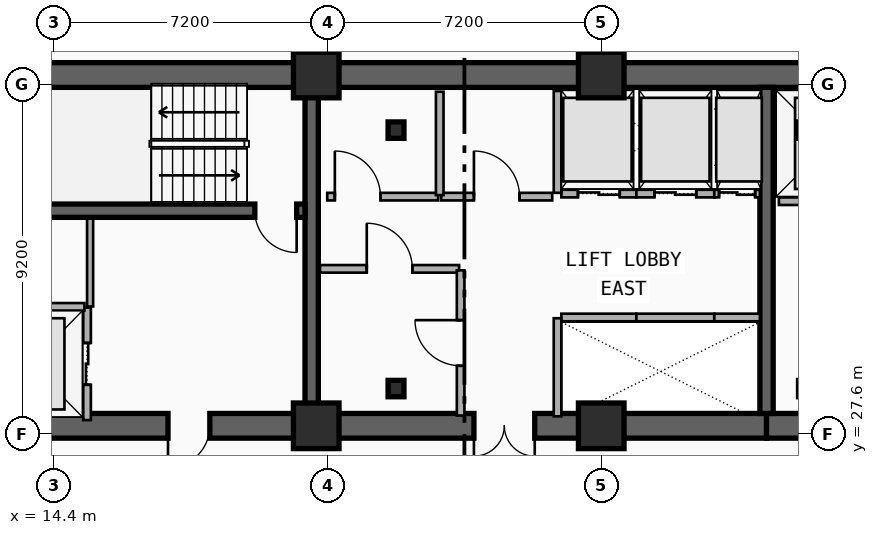
"""IFC4 building model, lengths in metres.
Left out: names, types, materials, properties, quantities, classifications, styles, units other than length and angle.
Written with IfcOpenShell. Run it as: python <this file> out.ifc"""

import sys

from ifc_helpers import new_model, si_unit, direction, frame, frame_2d, origin, origin_2d, place, context, subcontext, project, spatial, rectangle, i_section, extrude, element, fill, save


model = new_model("IFC4")
c1 = context("Model", 3, precision=1e-05, world=origin(), true_north=direction((0.0, 1.0)))
c2 = subcontext(c1, "Body", "Model", "MODEL_VIEW")
j1 = project(units=[si_unit("LENGTHUNIT", "METRE"), si_unit("PLANEANGLEUNIT", "RADIAN")], contexts=[c1])
p1 = place(None, origin())
s1 = spatial("IfcSite", under=j1, at=p1, CompositionType="ELEMENT")
p2 = place(p1, origin())
s2 = spatial("IfcBuilding", under=s1, at=p2, CompositionType="ELEMENT")
p3 = place(p2, frame((0.0, 0.0, 101.3)))
s3 = spatial("IfcBuildingStorey", under=s2, at=p3, CompositionType="ELEMENT", Elevation=101.3)
p4 = place(p3, frame((12.15, 37.05, 0.0), z_axis=(0.0, 0.0, 1.0), x_axis=(1.0, 0.0, 0.0)))
e1 = element("IfcWall", 1, at=p4, inside=s3, PredefinedType="SHEAR", context=c2, shape_type="SweptSolid", body=[
    extrude(rectangle(XDim=33.23, YDim=0.65, at=frame_2d((16.615, 0.0))), origin(), (0.0, 0.0, 1.0), 3.5),
])
p5 = place(p3, frame((21.18, 27.82, 0.0), z_axis=(0.0, 0.0, 1.0), x_axis=(-1.0, 0.0, 0.0)))
e2 = element("IfcWall", 2, at=p5, inside=s3, PredefinedType="SHEAR", context=c2, shape_type="SweptSolid", body=[
    extrude(rectangle(XDim=9.03, YDim=0.65, at=frame_2d((4.515, 0.0))), origin(), (0.0, 0.0, 1.0), 3.5),
])
p6 = place(p5, frame((2.68, 0.0, 0.0)))
e3 = element("IfcOpeningElement", 3, at=p6, cuts=e2, PredefinedType="OPENING", context=c2, shape_type="SweptSolid", body=[
    extrude(rectangle(XDim=1.1, YDim=2.15, at=frame_2d((0.55, 1.075))), frame((0.0, 0.335, 0.0), z_axis=(0.0, -1.0, 0.0), x_axis=(1.0, 0.0, 0.0)), (0.0, 0.0, 1.0), 0.67),
])
p7 = place(p3, frame((33.15, 27.82, 0.0), z_axis=(0.0, 0.0, 1.0), x_axis=(-1.0, 0.0, 0.0)))
e4 = element("IfcWall", 4, at=p7, inside=s3, PredefinedType="SHEAR", context=c2, shape_type="SweptSolid", body=[
    extrude(rectangle(XDim=11.97, YDim=0.65, at=frame_2d((5.985, 0.0))), origin(), (0.0, 0.0, 1.0), 3.5),
])
p8 = place(p7, frame((6.1, 0.0, 0.0)))
e5 = element("IfcOpeningElement", 5, at=p8, cuts=e4, PredefinedType="OPENING", context=c2, shape_type="SweptSolid", body=[
    extrude(rectangle(XDim=1.6, YDim=2.2, at=frame_2d((0.8, 1.1))), frame((0.0, 0.335, 0.0), z_axis=(0.0, -1.0, 0.0), x_axis=(1.0, 0.0, 0.0)), (0.0, 0.0, 1.0), 0.67),
])
p9 = place(p3, frame((45.38, 27.82, 0.0), z_axis=(0.0, 0.0, 1.0), x_axis=(-1.0, 0.0, 0.0)))
e6 = element("IfcWall", 6, at=p9, inside=s3, PredefinedType="SHEAR", context=c2, shape_type="SweptSolid", body=[
    extrude(rectangle(XDim=12.23, YDim=0.65, at=frame_2d((6.115, 0.0))), origin(), (0.0, 0.0, 1.0), 3.5),
])
p10 = place(p9, frame((9.93, 0.0, 0.0)))
e7 = element("IfcOpeningElement", 7, at=p10, cuts=e6, PredefinedType="OPENING", context=c2, shape_type="SweptSolid", body=[
    extrude(rectangle(XDim=1.1, YDim=2.15, at=frame_2d((0.55, 1.075))), frame((0.0, 0.335, 0.0), z_axis=(0.0, -1.0, 0.0), x_axis=(1.0, 0.0, 0.0)), (0.0, 0.0, 1.0), 0.67),
])
p11 = place(p9, frame((6.23, 0.0, 0.0)))
e8 = element("IfcOpeningElement", 8, at=p11, cuts=e6, PredefinedType="OPENING", context=c2, shape_type="SweptSolid", body=[
    extrude(rectangle(XDim=1.1, YDim=2.15, at=frame_2d((0.55, 1.075))), frame((0.0, 0.335, 0.0), z_axis=(0.0, -1.0, 0.0), x_axis=(1.0, 0.0, 0.0)), (0.0, 0.0, 1.0), 0.67),
])
for number, where, z_axis, x_axis in (
    (9, (21.18, 28.145, 0.0), (0.0, 0.0, 1.0), (0.0, 1.0, 0.0)),
    (10, (33.15, 28.145, 0.0), (0.0, 0.0, 1.0), (0.0, 1.0, 0.0)),
):
    element("IfcWall", number, at=place(p3, frame(where, z_axis=z_axis, x_axis=x_axis)), inside=s3, PredefinedType="SHEAR", context=c2, shape_type="SweptSolid", body=[
        extrude(rectangle(XDim=8.58, YDim=0.35, at=frame_2d((4.29, 0.0))), origin(), (0.0, 0.0, 1.0), 3.5),
    ])
p12 = place(p3, frame((21.005, 33.48, 0.0), z_axis=(0.0, 0.0, 1.0), x_axis=(-1.0, 0.0, 0.0)))
e11 = element("IfcWall", 11, at=p12, inside=s3, PredefinedType="SHEAR", context=c2, shape_type="SweptSolid", body=[
    extrude(rectangle(XDim=8.53, YDim=0.35, at=frame_2d((4.265, 0.0))), origin(), (0.0, 0.0, 1.0), 3.5),
])
p13 = place(p12, frame((0.22, 0.0, 0.0)))
e12 = element("IfcOpeningElement", 12, at=p13, cuts=e11, PredefinedType="OPENING", context=c2, shape_type="SweptSolid", body=[
    extrude(rectangle(XDim=1.1, YDim=2.15, at=frame_2d((0.55, 1.075))), frame((0.0, 0.185, 0.0), z_axis=(0.0, -1.0, 0.0), x_axis=(1.0, 0.0, 0.0)), (0.0, 0.0, 1.0), 0.37),
])
for number, where, z_axis, x_axis in (
    (13, (23.4, 28.8, 0.0), (0.0, 0.0, 1.0), (1.0, 0.0, 0.0)),
    (14, (23.4, 35.6, 0.0), (0.0, 0.0, 1.0), (1.0, 0.0, 0.0)),
):
    element("IfcColumn", number, at=place(p3, frame(where, z_axis=z_axis, x_axis=x_axis)), inside=s3, PredefinedType="COLUMN", context=c2, shape_type="SweptSolid", body=[
        extrude(i_section(OverallWidth=0.418, OverallDepth=0.432, WebThickness=0.035, FlangeThickness=0.056, FilletRadius=0.015, at=origin_2d()), origin(), (0.0, 0.0, 1.0), 3.5),
    ])
for number, where, z_axis, x_axis in (
    (15, (21.3, 27.82, 0.0), (0.0, 0.0, 1.0), (1.0, 0.0, 0.0)),
    (16, (21.3, 37.05, 0.0), (0.0, 0.0, 1.0), (1.0, 0.0, 0.0)),
    (17, (28.8, 27.82, 0.0), (0.0, 0.0, 1.0), (1.0, 0.0, 0.0)),
    (18, (28.8, 37.05, 0.0), (0.0, 0.0, 1.0), (1.0, 0.0, 0.0)),
):
    element("IfcColumn", number, at=place(p3, frame(where, z_axis=z_axis, x_axis=x_axis)), inside=s3, PredefinedType="COLUMN", context=c2, shape_type="SweptSolid", body=[
        extrude(rectangle(XDim=1.2, YDim=1.2, at=origin_2d()), origin(), (0.0, 0.0, 1.0), 3.5),
    ])
p14 = place(p3, frame((15.27, 27.97, 0.0), z_axis=(0.0, 0.0, 1.0), x_axis=(0.0, 1.0, 0.0)))
e19 = element("IfcWall", 19, at=p14, inside=s3, PredefinedType="PARTITIONING", context=c2, shape_type="SweptSolid", body=[
    extrude(rectangle(XDim=2.96, YDim=0.2, at=frame_2d((1.48, 0.0))), origin(), (0.0, 0.0, 1.0), 2.212),
])
p15 = place(p14, frame((0.93, 0.0, 0.0)))
e20 = element("IfcOpeningElement", 20, at=p15, cuts=e19, PredefinedType="OPENING", context=c2, shape_type="SweptSolid", body=[
    extrude(rectangle(XDim=1.1, YDim=2.15, at=frame_2d((0.55, 1.075))), frame((0.0, 0.11, 0.0), z_axis=(0.0, -1.0, 0.0), x_axis=(1.0, 0.0, 0.0)), (0.0, 0.0, 1.0), 0.22),
])
p16 = place(p3, frame((12.45, 30.95, 0.0), z_axis=(0.0, 0.0, 1.0), x_axis=(1.0, 0.0, 0.0)))
e21 = element("IfcWall", 21, at=p16, inside=s3, PredefinedType="PARTITIONING", context=c2, shape_type="SweptSolid", body=[
    extrude(rectangle(XDim=2.75, YDim=0.2, at=frame_2d((1.375, 0.0))), origin(), (0.0, 0.0, 1.0), 2.212),
])
p17 = place(p3, frame((33.475, 33.73, 0.0), z_axis=(0.0, 0.0, 1.0), x_axis=(1.0, 0.0, 0.0)))
e22 = element("IfcWall", 22, at=p17, inside=s3, PredefinedType="PARTITIONING", context=c2, shape_type="SweptSolid", body=[
    extrude(rectangle(XDim=2.725, YDim=0.2, at=frame_2d((1.362, 0.0))), origin(), (0.0, 0.0, 1.0), 2.212),
])
p18 = place(p17, frame((0.812, 0.0, 0.0)))
e23 = element("IfcOpeningElement", 23, at=p18, cuts=e22, PredefinedType="OPENING", context=c2, shape_type="SweptSolid", body=[
    extrude(rectangle(XDim=1.1, YDim=2.15, at=frame_2d((0.55, 1.075))), frame((0.0, 0.11, 0.0), z_axis=(0.0, -1.0, 0.0), x_axis=(1.0, 0.0, 0.0)), (0.0, 0.0, 1.0), 0.22),
])
p19 = place(p3, frame((27.75, 30.67, 0.0), z_axis=(0.0, 0.0, 1.0), x_axis=(1.0, 0.0, 0.0)))
e24 = element("IfcWall", 24, at=p19, inside=s3, PredefinedType="PARTITIONING", context=c2, shape_type="SweptSolid", body=[
    extrude(rectangle(XDim=1.975, YDim=0.2, at=frame_2d((0.988, 0.0))), origin(), (0.0, 0.0, 1.0), 2.212),
])
p20 = place(p3, frame((27.65, 28.07, 0.0), z_axis=(0.0, 0.0, 1.0), x_axis=(0.0, 1.0, 0.0)))
e25 = element("IfcWall", 25, at=p20, inside=s3, PredefinedType="PARTITIONING", context=c2, shape_type="SweptSolid", body=[
    extrude(rectangle(XDim=2.58, YDim=0.2, at=frame_2d((1.29, 0.0))), origin(), (0.0, 0.0, 1.0), 2.212),
])
p21 = place(p3, frame((29.725, 30.67, 0.0), z_axis=(0.0, 0.0, 1.0), x_axis=(1.0, 0.0, 0.0)))
e26 = element("IfcWall", 26, at=p21, inside=s3, PredefinedType="PARTITIONING", context=c2, shape_type="SweptSolid", body=[
    extrude(rectangle(XDim=2.05, YDim=0.2, at=frame_2d((1.025, 0.0))), origin(), (0.0, 0.0, 1.0), 2.62),
])
p22 = place(p3, frame((31.775, 30.67, 0.0), z_axis=(0.0, 0.0, 1.0), x_axis=(1.0, 0.0, 0.0)))
e27 = element("IfcWall", 27, at=p22, inside=s3, PredefinedType="PARTITIONING", context=c2, shape_type="SweptSolid", body=[
    extrude(rectangle(XDim=1.2, YDim=0.2, at=frame_2d((0.6, 0.0))), origin(), (0.0, 0.0, 1.0), 2.62),
])
p23 = place(p3, frame((27.75, 33.93, 0.0), z_axis=(0.0, 0.0, 1.0), x_axis=(1.0, 0.0, 0.0)))
e28 = element("IfcWall", 28, at=p23, inside=s3, PredefinedType="PARTITIONING", context=c2, shape_type="SweptSolid", body=[
    extrude(rectangle(XDim=1.975, YDim=0.2, at=frame_2d((0.988, 0.0))), origin(), (0.0, 0.0, 1.0), 2.212),
])
p24 = place(p23, frame((0.438, 0.0, 0.0)))
e29 = element("IfcOpeningElement", 29, at=p24, cuts=e28, PredefinedType="OPENING", context=c2, shape_type="SweptSolid", body=[
    extrude(rectangle(XDim=1.1, YDim=2.15, at=frame_2d((0.55, 1.075))), frame((0.0, 0.11, 0.0), z_axis=(0.0, -1.0, 0.0), x_axis=(1.0, 0.0, 0.0)), (0.0, 0.0, 1.0), 0.22),
])
p25 = place(p3, frame((27.65, 33.95, 0.0), z_axis=(0.0, 0.0, 1.0), x_axis=(0.0, 1.0, 0.0)))
e30 = element("IfcWall", 30, at=p25, inside=s3, PredefinedType="PARTITIONING", context=c2, shape_type="SweptSolid", body=[
    extrude(rectangle(XDim=2.68, YDim=0.2, at=frame_2d((1.34, 0.0))), origin(), (0.0, 0.0, 1.0), 2.212),
])
p26 = place(p3, frame((29.725, 33.93, 0.0), z_axis=(0.0, 0.0, 1.0), x_axis=(1.0, 0.0, 0.0)))
e31 = element("IfcWall", 31, at=p26, inside=s3, PredefinedType="PARTITIONING", context=c2, shape_type="SweptSolid", body=[
    extrude(rectangle(XDim=2.05, YDim=0.2, at=frame_2d((1.025, 0.0))), origin(), (0.0, 0.0, 1.0), 3.24),
])
p27 = place(p26, frame((0.475, 0.0, 0.0)))
e32 = element("IfcOpeningElement", 32, at=p27, cuts=e31, PredefinedType="OPENING", context=c2, shape_type="SweptSolid", body=[
    extrude(rectangle(XDim=1.1, YDim=2.15, at=frame_2d((0.55, 1.075))), frame((0.0, 0.11, 0.0), z_axis=(0.0, -1.0, 0.0), x_axis=(1.0, 0.0, 0.0)), (0.0, 0.0, 1.0), 0.22),
])
p28 = place(p3, frame((31.775, 33.93, 0.0), z_axis=(0.0, 0.0, 1.0), x_axis=(1.0, 0.0, 0.0)))
e33 = element("IfcWall", 33, at=p28, inside=s3, PredefinedType="PARTITIONING", context=c2, shape_type="SweptSolid", body=[
    extrude(rectangle(XDim=1.2, YDim=0.2, at=frame_2d((0.6, 0.0))), origin(), (0.0, 0.0, 1.0), 3.24),
])
p29 = place(p28, frame((0.125, 0.0, 0.0)))
e34 = element("IfcOpeningElement", 34, at=p29, cuts=e33, PredefinedType="OPENING", context=c2, shape_type="SweptSolid", body=[
    extrude(rectangle(XDim=0.95, YDim=2.15, at=frame_2d((0.475, 1.075))), frame((0.0, 0.11, 0.0), z_axis=(0.0, -1.0, 0.0), x_axis=(1.0, 0.0, 0.0)), (0.0, 0.0, 1.0), 0.22),
])
p30 = place(p3, frame((21.4, 31.95, 0.0), z_axis=(0.0, 0.0, 1.0), x_axis=(1.0, 0.0, 0.0)))
e35 = element("IfcWall", 35, at=p30, inside=s3, PredefinedType="PARTITIONING", context=c2, shape_type="SweptSolid", body=[
    extrude(rectangle(XDim=3.66, YDim=0.2, at=frame_2d((1.83, 0.0))), origin(), (0.0, 0.0, 1.0), 2.28),
])
p31 = place(p30, frame((1.23, 0.0, 0.0)))
e36 = element("IfcOpeningElement", 36, at=p31, cuts=e35, PredefinedType="OPENING", context=c2, shape_type="SweptSolid", body=[
    extrude(rectangle(XDim=1.2, YDim=2.15, at=frame_2d((0.6, 1.075))), frame((0.0, 0.11, 0.0), z_axis=(0.0, -1.0, 0.0), x_axis=(1.0, 0.0, 0.0)), (0.0, 0.0, 1.0), 0.22),
])
p32 = place(p3, frame((21.59, 33.85, 0.0), z_axis=(0.0, 0.0, 1.0), x_axis=(1.0, 0.0, 0.0)))
e37 = element("IfcWall", 37, at=p32, inside=s3, PredefinedType="PARTITIONING", context=c2, shape_type="SweptSolid", body=[
    extrude(rectangle(XDim=2.92, YDim=0.2, at=frame_2d((1.46, 0.0))), origin(), (0.0, 0.0, 1.0), 2.28),
])
p33 = place(p32, frame((0.2, 0.0, 0.0)))
e38 = element("IfcOpeningElement", 38, at=p33, cuts=e37, PredefinedType="OPENING", context=c2, shape_type="SweptSolid", body=[
    extrude(rectangle(XDim=1.2, YDim=2.15, at=frame_2d((0.6, 1.075))), frame((0.0, 0.11, 0.0), z_axis=(0.0, -1.0, 0.0), x_axis=(1.0, 0.0, 0.0)), (0.0, 0.0, 1.0), 0.22),
])
p34 = place(p3, frame((24.59, 33.85, 0.0), z_axis=(0.0, 0.0, 1.0), x_axis=(1.0, 0.0, 0.0)))
e39 = element("IfcWall", 39, at=p34, inside=s3, PredefinedType="PARTITIONING", context=c2, shape_type="SweptSolid", body=[
    extrude(rectangle(XDim=2.92, YDim=0.2, at=frame_2d((1.46, 0.0))), origin(), (0.0, 0.0, 1.0), 3.24),
])
p35 = place(p34, frame((0.86, 0.0, 0.0)))
e40 = element("IfcOpeningElement", 40, at=p35, cuts=e39, PredefinedType="OPENING", context=c2, shape_type="SweptSolid", body=[
    extrude(rectangle(XDim=1.2, YDim=2.15, at=frame_2d((0.6, 1.075))), frame((0.0, 0.11, 0.0), z_axis=(0.0, -1.0, 0.0), x_axis=(1.0, 0.0, 0.0)), (0.0, 0.0, 1.0), 0.22),
])
p36 = place(p3, frame((25.1, 28.09, 0.0), z_axis=(0.0, 0.0, 1.0), x_axis=(0.0, 1.0, 0.0)))
e41 = element("IfcWall", 41, at=p36, inside=s3, PredefinedType="PARTITIONING", context=c2, shape_type="SweptSolid", body=[
    extrude(rectangle(XDim=3.82, YDim=0.2, at=frame_2d((1.91, 0.0))), origin(), (0.0, 0.0, 1.0), 2.62),
])
p37 = place(p36, frame((1.31, 0.0, 0.0)))
e42 = element("IfcOpeningElement", 42, at=p37, cuts=e41, PredefinedType="OPENING", context=c2, shape_type="SweptSolid", body=[
    extrude(rectangle(XDim=1.2, YDim=2.15, at=frame_2d((0.6, 1.075))), frame((0.0, 0.11, 0.0), z_axis=(0.0, -1.0, 0.0), x_axis=(1.0, 0.0, 0.0)), (0.0, 0.0, 1.0), 0.22),
])
p38 = place(p3, frame((24.55, 33.89, 0.0), z_axis=(0.0, 0.0, 1.0), x_axis=(0.0, 1.0, 0.0)))
e43 = element("IfcWall", 43, at=p38, inside=s3, PredefinedType="PARTITIONING", context=c2, shape_type="SweptSolid", body=[
    extrude(rectangle(XDim=2.72, YDim=0.2, at=frame_2d((1.36, 0.0))), origin(), (0.0, 0.0, 1.0), 3.24),
])
p39 = place(p3, frame((15.35, 30.96, 0.0), z_axis=(0.0, 0.0, 1.0), x_axis=(0.0, 1.0, 0.0)))
e44 = element("IfcWall", 44, at=p39, inside=s3, PredefinedType="PARTITIONING", context=c2, shape_type="SweptSolid", body=[
    extrude(rectangle(XDim=2.31, YDim=0.16, at=frame_2d((1.155, 0.0))), origin(), (0.0, 0.0, 1.0), 3.24),
])
p40 = place(p15, origin())
e45 = element("IfcDoor", 45, at=p40, inside=s3, OperationType="DOUBLE_DOOR_SLIDING", PredefinedType="DOOR", context=c2, shape_type="SweptSolid", body=[
    extrude(rectangle(XDim=1.1, YDim=2.15, at=frame_2d((0.55, 1.075))), frame((0.0, 0.025, 0.0), z_axis=(0.0, -1.0, 0.0), x_axis=(1.0, 0.0, 0.0)), (0.0, 0.0, 1.0), 0.05),
])
fill(e20, e45)
p41 = place(p24, origin())
e46 = element("IfcDoor", 46, at=p41, inside=s3, OperationType="DOUBLE_DOOR_SLIDING", PredefinedType="DOOR", context=c2, shape_type="SweptSolid", body=[
    extrude(rectangle(XDim=1.1, YDim=2.15, at=frame_2d((0.55, 1.075))), frame((0.0, 0.025, 0.0), z_axis=(0.0, -1.0, 0.0), x_axis=(1.0, 0.0, 0.0)), (0.0, 0.0, 1.0), 0.05),
])
fill(e29, e46)
p42 = place(p27, origin())
e47 = element("IfcDoor", 47, at=p42, inside=s3, OperationType="DOUBLE_DOOR_SLIDING", PredefinedType="DOOR", context=c2, shape_type="SweptSolid", body=[
    extrude(rectangle(XDim=1.1, YDim=2.15, at=frame_2d((0.55, 1.075))), frame((0.0, 0.025, 0.0), z_axis=(0.0, -1.0, 0.0), x_axis=(1.0, 0.0, 0.0)), (0.0, 0.0, 1.0), 0.05),
])
fill(e32, e47)
p43 = place(p29, origin())
e48 = element("IfcDoor", 48, at=p43, inside=s3, OperationType="DOUBLE_DOOR_SLIDING", PredefinedType="DOOR", context=c2, shape_type="SweptSolid", body=[
    extrude(rectangle(XDim=0.95, YDim=2.15, at=frame_2d((0.475, 1.075))), frame((0.0, 0.025, 0.0), z_axis=(0.0, -1.0, 0.0), x_axis=(1.0, 0.0, 0.0)), (0.0, 0.0, 1.0), 0.05),
])
fill(e34, e48)
p44 = place(p13, origin())
e49 = element("IfcDoor", 49, at=p44, inside=s3, OperationType="SINGLE_SWING_LEFT", PredefinedType="DOOR", context=c2, shape_type="SweptSolid", body=[
    extrude(rectangle(XDim=1.1, YDim=2.15, at=frame_2d((0.55, 1.075))), frame((0.0, 0.025, 0.0), z_axis=(0.0, -1.0, 0.0), x_axis=(1.0, 0.0, 0.0)), (0.0, 0.0, 1.0), 0.05),
])
fill(e12, e49)
p45 = place(p6, origin())
e50 = element("IfcDoor", 50, at=p45, inside=s3, OperationType="SINGLE_SWING_RIGHT", PredefinedType="DOOR", context=c2, shape_type="SweptSolid", body=[
    extrude(rectangle(XDim=1.1, YDim=2.15, at=frame_2d((0.55, 1.075))), frame((0.0, 0.025, 0.0), z_axis=(0.0, -1.0, 0.0), x_axis=(1.0, 0.0, 0.0)), (0.0, 0.0, 1.0), 0.05),
])
fill(e3, e50)
p46 = place(p8, origin())
e51 = element("IfcDoor", 51, at=p46, inside=s3, OperationType="SINGLE_SWING_LEFT", PredefinedType="DOOR", context=c2, shape_type="SweptSolid", body=[
    extrude(rectangle(XDim=1.6, YDim=2.2, at=frame_2d((0.8, 1.1))), frame((0.0, 0.025, 0.0), z_axis=(0.0, -1.0, 0.0), x_axis=(1.0, 0.0, 0.0)), (0.0, 0.0, 1.0), 0.05),
])
fill(e5, e51)
p47 = place(p31, origin())
e52 = element("IfcDoor", 52, at=p47, inside=s3, OperationType="SINGLE_SWING_LEFT", PredefinedType="DOOR", context=c2, shape_type="SweptSolid", body=[
    extrude(rectangle(XDim=1.2, YDim=2.15, at=frame_2d((0.6, 1.075))), frame((0.0, 0.025, 0.0), z_axis=(0.0, -1.0, 0.0), x_axis=(1.0, 0.0, 0.0)), (0.0, 0.0, 1.0), 0.05),
])
fill(e36, e52)
p48 = place(p33, origin())
e53 = element("IfcDoor", 53, at=p48, inside=s3, OperationType="SINGLE_SWING_LEFT", PredefinedType="DOOR", context=c2, shape_type="SweptSolid", body=[
    extrude(rectangle(XDim=1.2, YDim=2.15, at=frame_2d((0.6, 1.075))), frame((0.0, 0.025, 0.0), z_axis=(0.0, -1.0, 0.0), x_axis=(1.0, 0.0, 0.0)), (0.0, 0.0, 1.0), 0.05),
])
fill(e38, e53)
p49 = place(p35, origin())
e54 = element("IfcDoor", 54, at=p49, inside=s3, OperationType="SINGLE_SWING_LEFT", PredefinedType="DOOR", context=c2, shape_type="SweptSolid", body=[
    extrude(rectangle(XDim=1.2, YDim=2.15, at=frame_2d((0.6, 1.075))), frame((0.0, 0.025, 0.0), z_axis=(0.0, -1.0, 0.0), x_axis=(1.0, 0.0, 0.0)), (0.0, 0.0, 1.0), 0.05),
])
fill(e40, e54)
p50 = place(p37, origin())
e55 = element("IfcDoor", 55, at=p50, inside=s3, OperationType="SINGLE_SWING_RIGHT", PredefinedType="DOOR", context=c2, shape_type="SweptSolid", body=[
    extrude(rectangle(XDim=1.2, YDim=2.15, at=frame_2d((0.6, 1.075))), frame((0.0, 0.025, 0.0), z_axis=(0.0, -1.0, 0.0), x_axis=(1.0, 0.0, 0.0)), (0.0, 0.0, 1.0), 0.05),
])
fill(e42, e55)
save(model, sys.argv[1])
